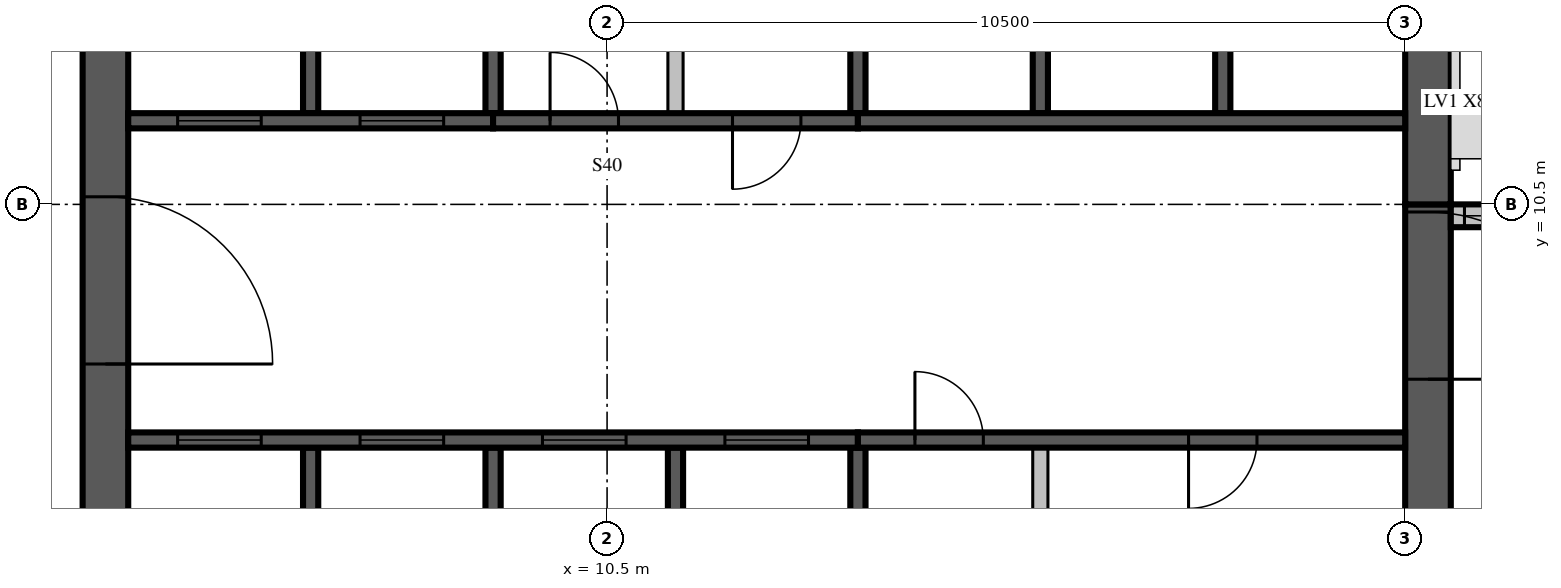
"""IFC4 building model, lengths in metres.
Left out: names, types, materials, properties, quantities, classifications, styles, units other than length and angle.
Written with IfcOpenShell. Run it as: python <this file> out.ifc"""

import sys

from ifc_helpers import new_model, si_unit, direction, frame, frame_2d, origin, place, context, subcontext, project, spatial, rectangle, extrude, source, transform, mapped, element, fill, save


model = new_model("IFC4")
c1 = context("Model", 3, precision=1e-05, world=origin(), true_north=direction((0.0, 1.0)))
c2 = subcontext(c1, "Body", "Model", "MODEL_VIEW")
j1 = project(units=[si_unit("LENGTHUNIT", "METRE"), si_unit("PLANEANGLEUNIT", "RADIAN")], contexts=[c1])
p1 = place(None, origin())
s1 = spatial("IfcSite", under=j1, at=p1, CompositionType="ELEMENT")
p2 = place(p1, origin())
s2 = spatial("IfcBuilding", under=s1, at=p2, CompositionType="ELEMENT")
p3 = place(p2, frame((0.0, 0.0, 358.0)))
s3 = spatial("IfcBuildingStorey", under=s2, at=p3, CompositionType="ELEMENT", Elevation=358.0)
m1 = source(origin(), c2, "Body", "SweptSolid", [
    extrude(rectangle(XDim=17.4, YDim=0.6, at=frame_2d((8.7, 0.0))), origin(), (0.0, 0.0, 1.0), 3.5),
])
p4 = place(p3, frame((3.9, 4.2, 0.0), z_axis=(0.0, 0.0, 1.0), x_axis=(0.0, 1.0, 0.0)))
e1 = element("IfcWall", 1, at=p4, inside=s3, PredefinedType="SHEAR", context=c2, shape_type="MappedRepresentation", body=[
    mapped(m1, transform((0.0, 0.0, 0.0), scale=1.0)),
])
m2 = source(origin(), c2, "Body", "SweptSolid", [
    extrude(rectangle(XDim=2.2, YDim=2.1, at=frame_2d((1.1, 1.05))), frame((0.0, 0.31, 0.0), z_axis=(0.0, -1.0, 0.0), x_axis=(1.0, 0.0, 0.0)), (0.0, 0.0, 1.0), 0.62),
])
p5 = place(p4, frame((4.2, 0.0, 0.0)))
e2 = element("IfcOpeningElement", 2, at=p5, cuts=e1, PredefinedType="OPENING", context=c2, shape_type="MappedRepresentation", body=[
    mapped(m2, transform((0.0, 0.0, 0.0), scale=1.0)),
])
m3 = source(origin(), c2, "Body", "SweptSolid", [
    extrude(rectangle(XDim=6.3, YDim=0.6, at=frame_2d((3.15, 0.0))), origin(), (0.0, 0.0, 1.0), 3.5),
])
p6 = place(p3, frame((21.3, 4.2, 0.0), z_axis=(0.0, 0.0, 1.0), x_axis=(0.0, 1.0, 0.0)))
e3 = element("IfcWall", 3, at=p6, inside=s3, PredefinedType="SHEAR", context=c2, shape_type="MappedRepresentation", body=[
    mapped(m3, transform((0.0, 0.0, 0.0), scale=1.0)),
])
p7 = place(p6, frame((4.0, 0.0, 0.0)))
e4 = element("IfcOpeningElement", 4, at=p7, cuts=e3, PredefinedType="OPENING", context=c2, shape_type="MappedRepresentation", body=[
    mapped(m2, transform((0.0, 0.0, 0.0), scale=1.0)),
])
m4 = source(origin(), c2, "Body", "SweptSolid", [
    extrude(rectangle(XDim=10.5, YDim=0.6, at=frame_2d((5.25, 0.0))), origin(), (0.0, 0.0, 1.0), 3.5),
])
p8 = place(p3, frame((21.3, 10.5, 0.0), z_axis=(0.0, 0.0, 1.0), x_axis=(0.0, 1.0, 0.0)))
e5 = element("IfcWall", 5, at=p8, inside=s3, PredefinedType="SHEAR", context=c2, shape_type="MappedRepresentation", body=[
    mapped(m4, transform((0.0, 0.0, 0.0), scale=1.0)),
])
m5 = source(origin(), c2, "Body", "SweptSolid", [
    extrude(rectangle(XDim=1.2, YDim=2.4, at=frame_2d((0.6, 1.2))), frame((0.0, 0.31, 0.0), z_axis=(0.0, -1.0, 0.0), x_axis=(1.0, 0.0, 0.0)), (0.0, 0.0, 1.0), 0.62),
])
p9 = place(p8, frame((5.7, 0.0, 0.6)))
e6 = element("IfcOpeningElement", 6, at=p9, cuts=e5, PredefinedType="OPENING", context=c2, shape_type="MappedRepresentation", body=[
    mapped(m5, transform((0.0, 0.0, 0.0), scale=1.0)),
])
m6 = source(origin(), c2, "Body", "SweptSolid", [
    extrude(rectangle(XDim=7.5, YDim=0.3, at=frame_2d((3.75, 0.0))), origin(), (0.0, 0.0, 1.0), 3.1),
])
p10 = place(p3, frame((29.1, 10.35, 0.0), z_axis=(0.0, 0.0, 1.0), x_axis=(-1.0, 0.0, 0.0)))
e7 = element("IfcWall", 7, at=p10, inside=s3, PredefinedType="STANDARD", context=c2, shape_type="MappedRepresentation", body=[
    mapped(m6, transform((0.0, 0.0, 0.0), scale=1.0)),
])
m7 = source(origin(), c2, "Body", "SweptSolid", [
    extrude(rectangle(XDim=3.0, YDim=2.0, at=frame_2d((1.5, 1.0))), frame((0.0, 0.16, 0.0), z_axis=(0.0, -1.0, 0.0), x_axis=(1.0, 0.0, 0.0)), (0.0, 0.0, 1.0), 0.32),
])
p11 = place(p10, frame((1.14, 0.0, 0.6)))
e8 = element("IfcOpeningElement", 8, at=p11, cuts=e7, PredefinedType="OPENING", context=c2, shape_type="MappedRepresentation", body=[
    mapped(m7, transform((0.0, 0.0, 0.0), scale=1.0)),
])
m8 = source(origin(), c2, "Body", "SweptSolid", [
    extrude(rectangle(XDim=1.8, YDim=2.0, at=frame_2d((0.9, 1.0))), frame((0.0, 0.16, 0.0), z_axis=(0.0, -1.0, 0.0), x_axis=(1.0, 0.0, 0.0)), (0.0, 0.0, 1.0), 0.32),
])
p12 = place(p10, frame((5.52, 0.0, 0.6)))
e9 = element("IfcOpeningElement", 9, at=p12, cuts=e7, PredefinedType="OPENING", context=c2, shape_type="MappedRepresentation", body=[
    mapped(m8, transform((0.0, 0.0, 0.0), scale=1.0)),
])
m9 = source(origin(), c2, "Body", "SweptSolid", [
    extrude(rectangle(XDim=3.1, YDim=0.2, at=frame_2d((1.55, 0.0))), origin(), (0.0, 0.0, 1.0), 3.5),
])
for number, where, z_axis, x_axis in (
    (10, (6.6, 4.2, 0.0), (0.0, 0.0, 1.0), (0.0, 1.0, 0.0)),
    (11, (9.0, 4.2, 0.0), (0.0, 0.0, 1.0), (0.0, 1.0, 0.0)),
    (12, (11.4, 4.2, 0.0), (0.0, 0.0, 1.0), (0.0, 1.0, 0.0)),
):
    element("IfcWall", number, at=place(p3, frame(where, z_axis=z_axis, x_axis=x_axis)), inside=s3, PredefinedType="SOLIDWALL", context=c2, shape_type="MappedRepresentation", body=[
        mapped(m9, transform((0.0, 0.0, 0.0), scale=1.0)),
    ])
m10 = source(origin(), c2, "Body", "SweptSolid", [
    extrude(rectangle(XDim=3.1, YDim=0.2, at=frame_2d((1.55, 0.0))), origin(), (0.0, 0.0, 1.0), 3.1),
])
p13 = place(p3, frame((13.8, 4.2, 0.0), z_axis=(0.0, 0.0, 1.0), x_axis=(0.0, 1.0, 0.0)))
e13 = element("IfcWall", 13, at=p13, inside=s3, PredefinedType="SOLIDWALL", context=c2, shape_type="MappedRepresentation", body=[
    mapped(m10, transform((0.0, 0.0, 0.0), scale=1.0)),
])
m11 = source(origin(), c2, "Body", "SweptSolid", [
    extrude(rectangle(XDim=3.1, YDim=0.2, at=frame_2d((1.55, 0.0))), origin(), (0.0, 0.0, 1.0), 3.1),
])
p14 = place(p3, frame((16.2, 4.2, 0.0), z_axis=(0.0, 0.0, 1.0), x_axis=(0.0, 1.0, 0.0)))
e14 = element("IfcWall", 14, at=p14, inside=s3, PredefinedType="PARTITIONING", context=c2, shape_type="MappedRepresentation", body=[
    mapped(m11, transform((0.0, 0.0, 0.0), scale=1.0)),
])
m12 = source(origin(), c2, "Body", "SweptSolid", [
    extrude(rectangle(XDim=3.0, YDim=0.2, at=frame_2d((1.5, 0.0))), origin(), (0.0, 0.0, 1.0), 3.5),
])
p15 = place(p3, frame((6.6, 11.7, 0.0), z_axis=(0.0, 0.0, 1.0), x_axis=(0.0, 1.0, 0.0)))
e15 = element("IfcWall", 15, at=p15, inside=s3, PredefinedType="SOLIDWALL", context=c2, shape_type="MappedRepresentation", body=[
    mapped(m12, transform((0.0, 0.0, 0.0), scale=1.0)),
])
m13 = source(origin(), c2, "Body", "SweptSolid", [
    extrude(rectangle(XDim=3.0, YDim=0.2, at=frame_2d((1.5, 0.0))), origin(), (0.0, 0.0, 1.0), 3.1),
])
for number, where, z_axis, x_axis in (
    (16, (9.0, 11.7, 0.0), (0.0, 0.0, 1.0), (0.0, 1.0, 0.0)),
    (17, (13.8, 11.7, 0.0), (0.0, 0.0, 1.0), (0.0, 1.0, 0.0)),
):
    element("IfcWall", number, at=place(p3, frame(where, z_axis=z_axis, x_axis=x_axis)), inside=s3, PredefinedType="SOLIDWALL", context=c2, shape_type="MappedRepresentation", body=[
        mapped(m13, transform((0.0, 0.0, 0.0), scale=1.0)),
    ])
for number, where, z_axis, x_axis in (
    (18, (16.2, 11.7, 0.0), (0.0, 0.0, 1.0), (0.0, 1.0, 0.0)),
    (19, (18.6, 11.7, 0.0), (0.0, 0.0, 1.0), (0.0, 1.0, 0.0)),
):
    element("IfcWall", number, at=place(p3, frame(where, z_axis=z_axis, x_axis=x_axis)), inside=s3, PredefinedType="SOLIDWALL", context=c2, shape_type="MappedRepresentation", body=[
        mapped(m12, transform((0.0, 0.0, 0.0), scale=1.0)),
    ])
m14 = source(origin(), c2, "Body", "SweptSolid", [
    extrude(rectangle(XDim=3.0, YDim=0.2, at=frame_2d((1.5, 0.0))), origin(), (0.0, 0.0, 1.0), 3.1),
])
p16 = place(p3, frame((11.4, 11.7, 0.0), z_axis=(0.0, 0.0, 1.0), x_axis=(0.0, 1.0, 0.0)))
e20 = element("IfcWall", 20, at=p16, inside=s3, PredefinedType="PARTITIONING", context=c2, shape_type="MappedRepresentation", body=[
    mapped(m14, transform((0.0, 0.0, 0.0), scale=1.0)),
])
m15 = source(origin(), c2, "Body", "SweptSolid", [
    extrude(rectangle(XDim=9.6, YDim=0.2, at=frame_2d((4.8, 0.0))), origin(), (0.0, 0.0, 1.0), 3.5),
])
p17 = place(p3, frame((4.2, 7.4, 0.0), z_axis=(0.0, 0.0, 1.0), x_axis=(1.0, 0.0, 0.0)))
e21 = element("IfcWall", 21, at=p17, inside=s3, PredefinedType="SOLIDWALL", context=c2, shape_type="MappedRepresentation", body=[
    mapped(m15, transform((0.0, 0.0, 0.0), scale=1.0)),
])
m16 = source(origin(), c2, "Body", "SweptSolid", [
    extrude(rectangle(XDim=1.1, YDim=2.1, at=frame_2d((0.55, 1.05))), frame((0.0, 0.11, 0.0), z_axis=(0.0, -1.0, 0.0), x_axis=(1.0, 0.0, 0.0)), (0.0, 0.0, 1.0), 0.22),
])
p18 = place(p17, frame((0.65, 0.0, 0.0)))
e22 = element("IfcOpeningElement", 22, at=p18, cuts=e21, PredefinedType="OPENING", context=c2, shape_type="MappedRepresentation", body=[
    mapped(m16, transform((0.0, 0.0, 0.0), scale=1.0)),
])
p19 = place(p17, frame((3.05, 0.0, 0.0)))
e23 = element("IfcOpeningElement", 23, at=p19, cuts=e21, PredefinedType="OPENING", context=c2, shape_type="MappedRepresentation", body=[
    mapped(m16, transform((0.0, 0.0, 0.0), scale=1.0)),
])
p20 = place(p17, frame((5.45, 0.0, 0.0)))
e24 = element("IfcOpeningElement", 24, at=p20, cuts=e21, PredefinedType="OPENING", context=c2, shape_type="MappedRepresentation", body=[
    mapped(m16, transform((0.0, 0.0, 0.0), scale=1.0)),
])
p21 = place(p17, frame((7.85, 0.0, 0.0)))
e25 = element("IfcOpeningElement", 25, at=p21, cuts=e21, PredefinedType="OPENING", context=c2, shape_type="MappedRepresentation", body=[
    mapped(m16, transform((0.0, 0.0, 0.0), scale=1.0)),
])
m17 = source(origin(), c2, "Body", "SweptSolid", [
    extrude(rectangle(XDim=7.2, YDim=0.2, at=frame_2d((3.6, 0.0))), origin(), (0.0, 0.0, 1.0), 3.1),
])
p22 = place(p3, frame((13.8, 7.4, 0.0), z_axis=(0.0, 0.0, 1.0), x_axis=(1.0, 0.0, 0.0)))
e26 = element("IfcWall", 26, at=p22, inside=s3, PredefinedType="SOLIDWALL", context=c2, shape_type="MappedRepresentation", body=[
    mapped(m17, transform((0.0, 0.0, 0.0), scale=1.0)),
])
m18 = source(origin(), c2, "Body", "SweptSolid", [
    extrude(rectangle(XDim=0.9, YDim=2.1, at=frame_2d((0.45, 1.05))), frame((0.0, 0.11, 0.0), z_axis=(0.0, -1.0, 0.0), x_axis=(1.0, 0.0, 0.0)), (0.0, 0.0, 1.0), 0.22),
])
p23 = place(p22, frame((0.75, 0.0, 0.0)))
e27 = element("IfcOpeningElement", 27, at=p23, cuts=e26, PredefinedType="OPENING", context=c2, shape_type="MappedRepresentation", body=[
    mapped(m18, transform((0.0, 0.0, 0.0), scale=1.0)),
])
p24 = place(p22, frame((4.35, 0.0, 0.0)))
e28 = element("IfcOpeningElement", 28, at=p24, cuts=e26, PredefinedType="OPENING", context=c2, shape_type="MappedRepresentation", body=[
    mapped(m18, transform((0.0, 0.0, 0.0), scale=1.0)),
])
m19 = source(origin(), c2, "Body", "SweptSolid", [
    extrude(rectangle(XDim=4.8, YDim=0.2, at=frame_2d((2.4, 0.0))), origin(), (0.0, 0.0, 1.0), 3.5),
])
p25 = place(p3, frame((4.2, 11.6, 0.0), z_axis=(0.0, 0.0, 1.0), x_axis=(1.0, 0.0, 0.0)))
e29 = element("IfcWall", 29, at=p25, inside=s3, PredefinedType="SOLIDWALL", context=c2, shape_type="MappedRepresentation", body=[
    mapped(m19, transform((0.0, 0.0, 0.0), scale=1.0)),
])
p26 = place(p25, frame((0.65, 0.0, 0.0)))
e30 = element("IfcOpeningElement", 30, at=p26, cuts=e29, PredefinedType="OPENING", context=c2, shape_type="MappedRepresentation", body=[
    mapped(m16, transform((0.0, 0.0, 0.0), scale=1.0)),
])
p27 = place(p25, frame((3.05, 0.0, 0.0)))
e31 = element("IfcOpeningElement", 31, at=p27, cuts=e29, PredefinedType="OPENING", context=c2, shape_type="MappedRepresentation", body=[
    mapped(m16, transform((0.0, 0.0, 0.0), scale=1.0)),
])
m20 = source(origin(), c2, "Body", "SweptSolid", [
    extrude(rectangle(XDim=4.8, YDim=0.2, at=frame_2d((2.4, 0.0))), origin(), (0.0, 0.0, 1.0), 3.1),
])
p28 = place(p3, frame((9.0, 11.6, 0.0), z_axis=(0.0, 0.0, 1.0), x_axis=(1.0, 0.0, 0.0)))
e32 = element("IfcWall", 32, at=p28, inside=s3, PredefinedType="SOLIDWALL", context=c2, shape_type="MappedRepresentation", body=[
    mapped(m20, transform((0.0, 0.0, 0.0), scale=1.0)),
])
p29 = place(p28, frame((0.75, 0.0, 0.0)))
e33 = element("IfcOpeningElement", 33, at=p29, cuts=e32, PredefinedType="OPENING", context=c2, shape_type="MappedRepresentation", body=[
    mapped(m18, transform((0.0, 0.0, 0.0), scale=1.0)),
])
p30 = place(p28, frame((3.15, 0.0, 0.0)))
e34 = element("IfcOpeningElement", 34, at=p30, cuts=e32, PredefinedType="OPENING", context=c2, shape_type="MappedRepresentation", body=[
    mapped(m18, transform((0.0, 0.0, 0.0), scale=1.0)),
])
m21 = source(origin(), c2, "Body", "SweptSolid", [
    extrude(rectangle(XDim=7.2, YDim=0.2, at=frame_2d((3.6, 0.0))), origin(), (0.0, 0.0, 1.0), 3.5),
])
p31 = place(p3, frame((13.8, 11.6, 0.0), z_axis=(0.0, 0.0, 1.0), x_axis=(1.0, 0.0, 0.0)))
e35 = element("IfcWall", 35, at=p31, inside=s3, PredefinedType="SOLIDWALL", context=c2, shape_type="MappedRepresentation", body=[
    mapped(m21, transform((0.0, 0.0, 0.0), scale=1.0)),
])
m22 = source(origin(), c2, "Body", "SweptSolid", [
    extrude(rectangle(XDim=1.8, YDim=2.0, at=frame_2d((0.9, 1.0))), frame((0.0, 0.03, 0.0), z_axis=(0.0, -1.0, 0.0), x_axis=(1.0, 0.0, 0.0)), (0.0, 0.0, 1.0), 0.06),
])
p32 = place(p12, origin())
e36 = element("IfcWindow", 36, at=p32, inside=s3, PartitioningType="SINGLE_PANEL", PredefinedType="WINDOW", context=c2, shape_type="MappedRepresentation", body=[
    mapped(m22, transform((0.0, 0.0, 0.0), scale=1.0)),
])
fill(e9, e36)
m23 = source(origin(), c2, "Body", "SweptSolid", [
    extrude(rectangle(XDim=1.1, YDim=2.1, at=frame_2d((0.55, 1.05))), frame((0.0, 0.025, 0.0), z_axis=(0.0, -1.0, 0.0), x_axis=(1.0, 0.0, 0.0)), (0.0, 0.0, 1.0), 0.05),
])
p33 = place(p18, origin())
e37 = element("IfcDoor", 37, at=p33, inside=s3, OperationType="SLIDING_TO_LEFT", PredefinedType="DOOR", context=c2, shape_type="MappedRepresentation", body=[
    mapped(m23, transform((0.0, 0.0, 0.0), scale=1.0)),
])
fill(e22, e37)
p34 = place(p19, origin())
e38 = element("IfcDoor", 38, at=p34, inside=s3, OperationType="SLIDING_TO_LEFT", PredefinedType="DOOR", context=c2, shape_type="MappedRepresentation", body=[
    mapped(m23, transform((0.0, 0.0, 0.0), scale=1.0)),
])
fill(e23, e38)
p35 = place(p20, origin())
e39 = element("IfcDoor", 39, at=p35, inside=s3, OperationType="SLIDING_TO_LEFT", PredefinedType="DOOR", context=c2, shape_type="MappedRepresentation", body=[
    mapped(m23, transform((0.0, 0.0, 0.0), scale=1.0)),
])
fill(e24, e39)
p36 = place(p21, origin())
e40 = element("IfcDoor", 40, at=p36, inside=s3, OperationType="SLIDING_TO_LEFT", PredefinedType="DOOR", context=c2, shape_type="MappedRepresentation", body=[
    mapped(m23, transform((0.0, 0.0, 0.0), scale=1.0)),
])
fill(e25, e40)
m24 = source(origin(), c2, "Body", "SweptSolid", [
    extrude(rectangle(XDim=0.9, YDim=2.1, at=frame_2d((0.45, 1.05))), frame((0.0, 0.025, 0.0), z_axis=(0.0, -1.0, 0.0), x_axis=(1.0, 0.0, 0.0)), (0.0, 0.0, 1.0), 0.05),
])
p37 = place(p23, origin())
e41 = element("IfcDoor", 41, at=p37, inside=s3, OperationType="SINGLE_SWING_LEFT", PredefinedType="DOOR", context=c2, shape_type="MappedRepresentation", body=[
    mapped(m24, transform((0.0, 0.0, 0.0), scale=1.0)),
])
fill(e27, e41)
p38 = place(p24, origin())
e42 = element("IfcDoor", 42, at=p38, inside=s3, OperationType="SINGLE_SWING_RIGHT", PredefinedType="DOOR", context=c2, shape_type="MappedRepresentation", body=[
    mapped(m24, transform((0.0, 0.0, 0.0), scale=1.0)),
])
fill(e28, e42)
p39 = place(p26, origin())
e43 = element("IfcDoor", 43, at=p39, inside=s3, OperationType="SLIDING_TO_LEFT", PredefinedType="DOOR", context=c2, shape_type="MappedRepresentation", body=[
    mapped(m23, transform((0.0, 0.0, 0.0), scale=1.0)),
])
fill(e30, e43)
p40 = place(p27, origin())
e44 = element("IfcDoor", 44, at=p40, inside=s3, OperationType="SLIDING_TO_LEFT", PredefinedType="DOOR", context=c2, shape_type="MappedRepresentation", body=[
    mapped(m23, transform((0.0, 0.0, 0.0), scale=1.0)),
])
fill(e31, e44)
p41 = place(p29, origin())
e45 = element("IfcDoor", 45, at=p41, inside=s3, OperationType="SINGLE_SWING_LEFT", PredefinedType="DOOR", context=c2, shape_type="MappedRepresentation", body=[
    mapped(m24, transform((0.0, 0.0, 0.0), scale=1.0)),
])
fill(e33, e45)
p42 = place(p30, origin())
e46 = element("IfcDoor", 46, at=p42, inside=s3, OperationType="SINGLE_SWING_RIGHT", PredefinedType="DOOR", context=c2, shape_type="MappedRepresentation", body=[
    mapped(m24, transform((0.0, 0.0, 0.0), scale=1.0)),
])
fill(e34, e46)
m25 = source(origin(), c2, "Body", "SweptSolid", [
    extrude(rectangle(XDim=2.2, YDim=2.1, at=frame_2d((1.1, 1.05))), frame((0.0, 0.025, 0.0), z_axis=(0.0, -1.0, 0.0), x_axis=(1.0, 0.0, 0.0)), (0.0, 0.0, 1.0), 0.05),
])
p43 = place(p7, origin())
e47 = element("IfcDoor", 47, at=p43, inside=s3, OperationType="DOUBLE_DOOR_SINGLE_SWING", PredefinedType="DOOR", context=c2, shape_type="MappedRepresentation", body=[
    mapped(m25, transform((0.0, 0.0, 0.0), scale=1.0)),
])
fill(e4, e47)
p44 = place(p5, origin())
e48 = element("IfcDoor", 48, at=p44, inside=s3, OperationType="DOUBLE_DOOR_SINGLE_SWING", PredefinedType="DOOR", context=c2, shape_type="MappedRepresentation", body=[
    mapped(m25, transform((0.0, 0.0, 0.0), scale=1.0)),
])
fill(e2, e48)
save(model, sys.argv[1])
